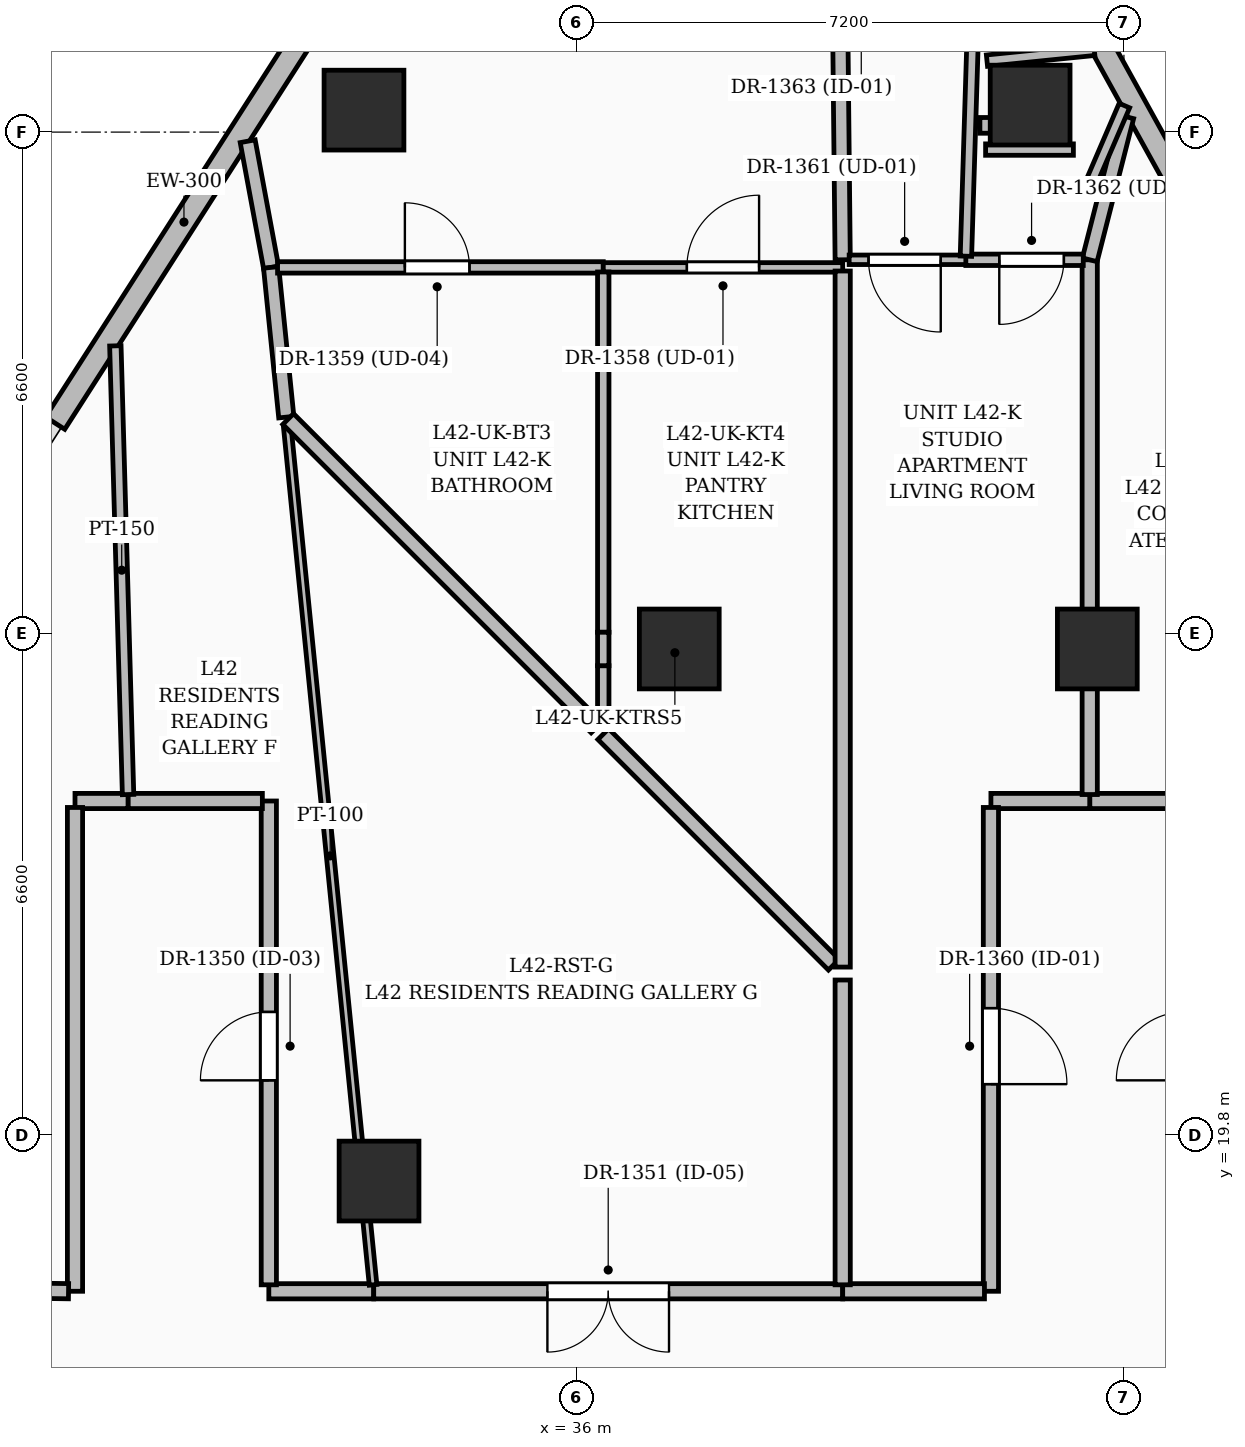
"""IFC4 building model, lengths in metres.
Left out: names, types, materials, properties, quantities, classifications, styles, units other than length and angle.
Written with IfcOpenShell. Run it as: python <this file> out.ifc"""

import sys

from ifc_helpers import new_model, si_unit, direction, frame, frame_2d, origin, origin_2d, place, context, subcontext, project, spatial, rectangle, extrude, element, fill, save


model = new_model("IFC4")
c1 = context("Model", 3, precision=1e-05, world=origin(), true_north=direction((0.0, 1.0)))
c2 = subcontext(c1, "Body", "Model", "MODEL_VIEW")
j1 = project(units=[si_unit("LENGTHUNIT", "METRE"), si_unit("PLANEANGLEUNIT", "RADIAN")], contexts=[c1])
p1 = place(None, origin())
s1 = spatial("IfcSite", under=j1, at=p1, CompositionType="ELEMENT")
p2 = place(p1, origin())
s2 = spatial("IfcBuilding", under=s1, at=p2, CompositionType="ELEMENT")
p3 = place(p2, frame((0.0, 0.0, 164.4)))
s3 = spatial("IfcBuildingStorey", under=s2, at=p3, CompositionType="ELEMENT", Elevation=164.4)
for number, where, z_axis, x_axis in (
    (1, (42.85, 26.2, 0.0), (0.0, 0.0, 1.0), (1.0, 0.0, 0.0)),
    (2, (37.35, 26.2, 0.0), (0.0, 0.0, 1.0), (1.0, 0.0, 0.0)),
    (3, (33.4, 19.2, 0.0), (0.0, 0.0, 1.0), (1.0, 0.0, 0.0)),
    (4, (41.966, 33.355, 0.0), (0.0, 0.0, 1.0), (1.0, 0.0, 0.0)),
    (5, (33.202, 33.289, 0.0), (0.0, 0.0, 1.0), (1.0, 0.0, 0.0)),
):
    element("IfcColumn", number, at=place(p3, frame(where, z_axis=z_axis, x_axis=x_axis)), inside=s3, PredefinedType="COLUMN", context=c2, shape_type="SweptSolid", body=[
        extrude(rectangle(XDim=1.05, YDim=1.05, at=origin_2d()), origin(), (0.0, 0.0, 1.0), 3.6),
    ])
p4 = place(p3, frame((29.139, 29.171, 0.0), z_axis=(0.0, 0.0, 1.0), x_axis=(0.539533329528, 0.841964242904, 0.0)))
e6 = element("IfcWall", 6, at=p4, inside=s3, PredefinedType="SOLIDWALL", context=c2, shape_type="SweptSolid", body=[
    extrude(rectangle(XDim=6.282, YDim=0.3, at=frame_2d((3.141, 0.0))), origin(), (0.0, 0.0, 1.0), 3.35),
])
p5 = place(p3, frame((42.762, 34.395, 0.0), z_axis=(0.0, 0.0, 1.0), x_axis=(0.484157246346, -0.874981005972, 0.0)))
e7 = element("IfcWall", 7, at=p5, inside=s3, PredefinedType="SOLIDWALL", context=c2, shape_type="SweptSolid", body=[
    extrude(rectangle(XDim=5.974, YDim=0.3, at=frame_2d((2.987, 0.0))), origin(), (0.0, 0.0, 1.0), 3.35),
])
p6 = place(p5, frame((2.525, 0.0, 0.6)))
e8 = element("IfcOpeningElement", 8, at=p6, cuts=e7, PredefinedType="OPENING", context=c2, shape_type="SweptSolid", body=[
    extrude(rectangle(XDim=1.5, YDim=2.1, at=frame_2d((0.75, 1.05))), frame((0.0, 0.16, 0.0), z_axis=(0.0, -1.0, 0.0), x_axis=(1.0, 0.0, 0.0)), (0.0, 0.0, 1.0), 0.32),
])
p7 = place(p3, frame((30.1, 24.2, 0.0), z_axis=(0.0, 0.0, 1.0), x_axis=(-1.0, 0.0, 0.0)))
e9 = element("IfcWall", 9, at=p7, inside=s3, PredefinedType="PARTITIONING", context=c2, shape_type="SweptSolid", body=[
    extrude(rectangle(XDim=0.7, YDim=0.2, at=frame_2d((0.35, 0.0))), origin(), (0.0, 0.0, 1.0), 2.712),
])
p8 = place(p3, frame((29.4, 24.115, 0.0), z_axis=(0.0, 0.0, 1.0), x_axis=(0.0, -1.0, 0.0)))
e10 = element("IfcWall", 10, at=p8, inside=s3, PredefinedType="PARTITIONING", context=c2, shape_type="SweptSolid", body=[
    extrude(rectangle(XDim=6.365, YDim=0.2, at=frame_2d((3.183, 0.0))), origin(), (0.0, 0.0, 1.0), 2.393),
])
p9 = place(p3, frame((29.315, 17.751, 0.0), z_axis=(0.0, 0.0, 1.0), x_axis=(-0.999898159275, 0.014271337684, 0.0)))
e11 = element("IfcWall", 11, at=p9, inside=s3, PredefinedType="PARTITIONING", context=c2, shape_type="SweptSolid", body=[
    extrude(rectangle(XDim=7.288, YDim=0.2, at=frame_2d((3.644, 0.0))), origin(), (0.0, 0.0, 1.0), 2.393),
])
p10 = place(p9, frame((2.879, 0.0, 0.0)))
e12 = element("IfcOpeningElement", 12, at=p10, cuts=e11, PredefinedType="OPENING", context=c2, shape_type="SweptSolid", body=[
    extrude(rectangle(XDim=1.6, YDim=2.3, at=frame_2d((0.8, 1.15))), frame((0.0, 0.11, 0.0), z_axis=(0.0, -1.0, 0.0), x_axis=(1.0, 0.0, 0.0)), (0.0, 0.0, 1.0), 0.22),
])
p11 = place(p3, frame((33.33, 17.75, 0.0), z_axis=(0.0, 0.0, 1.0), x_axis=(-1.0, 0.0, 0.0)))
e13 = element("IfcWall", 13, at=p11, inside=s3, PredefinedType="PARTITIONING", context=c2, shape_type="SweptSolid", body=[
    extrude(rectangle(XDim=1.38, YDim=0.2, at=frame_2d((0.69, 0.0))), origin(), (0.0, 0.0, 1.0), 3.35),
])
p12 = place(p3, frame((31.95, 17.835, 0.0), z_axis=(0.0, 0.0, 1.0), x_axis=(0.0, 1.0, 0.0)))
e14 = element("IfcWall", 14, at=p12, inside=s3, PredefinedType="PARTITIONING", context=c2, shape_type="SweptSolid", body=[
    extrude(rectangle(XDim=6.365, YDim=0.2, at=frame_2d((3.183, 0.0))), origin(), (0.0, 0.0, 1.0), 2.393),
])
p13 = place(p12, frame((2.69, 0.0, 0.0)))
e15 = element("IfcOpeningElement", 15, at=p13, cuts=e14, PredefinedType="OPENING", context=c2, shape_type="SweptSolid", body=[
    extrude(rectangle(XDim=0.9, YDim=2.1, at=frame_2d((0.45, 1.05))), frame((0.0, 0.11, 0.0), z_axis=(0.0, -1.0, 0.0), x_axis=(1.0, 0.0, 0.0)), (0.0, 0.0, 1.0), 0.22),
])
p14 = place(p3, frame((31.865, 24.2, 0.0), z_axis=(0.0, 0.0, 1.0), x_axis=(-1.0, 0.0, 0.0)))
e16 = element("IfcWall", 16, at=p14, inside=s3, PredefinedType="PARTITIONING", context=c2, shape_type="SweptSolid", body=[
    extrude(rectangle(XDim=1.765, YDim=0.2, at=frame_2d((0.882, 0.0))), origin(), (0.0, 0.0, 1.0), 2.712),
])
p15 = place(p3, frame((39.5, 17.75, 0.0), z_axis=(0.0, 0.0, 1.0), x_axis=(-1.0, 0.0, 0.0)))
e17 = element("IfcWall", 17, at=p15, inside=s3, PredefinedType="PARTITIONING", context=c2, shape_type="SweptSolid", body=[
    extrude(rectangle(XDim=6.17, YDim=0.2, at=frame_2d((3.085, 0.0))), origin(), (0.0, 0.0, 1.0), 2.436),
])
p16 = place(p15, frame((2.285, 0.0, 0.0)))
e18 = element("IfcOpeningElement", 18, at=p16, cuts=e17, PredefinedType="OPENING", context=c2, shape_type="SweptSolid", body=[
    extrude(rectangle(XDim=1.6, YDim=2.3, at=frame_2d((0.8, 1.15))), frame((0.0, 0.11, 0.0), z_axis=(0.0, -1.0, 0.0), x_axis=(1.0, 0.0, 0.0)), (0.0, 0.0, 1.0), 0.22),
])
p17 = place(p3, frame((43.915, 24.2, 0.0), z_axis=(0.0, 0.0, 1.0), x_axis=(-1.0, 0.0, 0.0)))
e19 = element("IfcWall", 19, at=p17, inside=s3, PredefinedType="PARTITIONING", context=c2, shape_type="SweptSolid", body=[
    extrude(rectangle(XDim=1.165, YDim=0.2, at=frame_2d((0.583, 0.0))), origin(), (0.0, 0.0, 1.0), 2.436),
])
p18 = place(p3, frame((42.75, 24.2, 0.0), z_axis=(0.0, 0.0, 1.0), x_axis=(-1.0, 0.0, 0.0)))
e20 = element("IfcWall", 20, at=p18, inside=s3, PredefinedType="PARTITIONING", context=c2, shape_type="SweptSolid", body=[
    extrude(rectangle(XDim=1.3, YDim=0.2, at=frame_2d((0.65, 0.0))), origin(), (0.0, 0.0, 1.0), 3.35),
])
p19 = place(p3, frame((41.45, 24.115, 0.0), z_axis=(0.0, 0.0, 1.0), x_axis=(0.0, -1.0, 0.0)))
e21 = element("IfcWall", 21, at=p19, inside=s3, PredefinedType="PARTITIONING", context=c2, shape_type="SweptSolid", body=[
    extrude(rectangle(XDim=6.365, YDim=0.2, at=frame_2d((3.183, 0.0))), origin(), (0.0, 0.0, 1.0), 3.35),
])
p20 = place(p19, frame((2.64, 0.0, 0.0)))
e22 = element("IfcOpeningElement", 22, at=p20, cuts=e21, PredefinedType="OPENING", context=c2, shape_type="SweptSolid", body=[
    extrude(rectangle(XDim=1.0, YDim=2.2, at=frame_2d((0.5, 1.1))), frame((0.0, 0.11, 0.0), z_axis=(0.0, -1.0, 0.0), x_axis=(1.0, 0.0, 0.0)), (0.0, 0.0, 1.0), 0.22),
])
p21 = place(p3, frame((41.365, 17.75, 0.0), z_axis=(0.0, 0.0, 1.0), x_axis=(-1.0, 0.0, 0.0)))
e23 = element("IfcWall", 23, at=p21, inside=s3, PredefinedType="PARTITIONING", context=c2, shape_type="SweptSolid", body=[
    extrude(rectangle(XDim=1.865, YDim=0.2, at=frame_2d((0.933, 0.0))), origin(), (0.0, 0.0, 1.0), 3.35),
])
p22 = place(p3, frame((30.098, 24.285, 0.0), z_axis=(0.0, 0.0, 1.0), x_axis=(-0.02836031544, 0.999597765358, 0.0)))
e24 = element("IfcWall", 24, at=p22, inside=s3, PredefinedType="PARTITIONING", context=c2, shape_type="SweptSolid", body=[
    extrude(rectangle(XDim=5.906, YDim=0.15, at=frame_2d((2.953, 0.0))), origin(), (0.0, 0.0, 1.0), 2.57),
])
p23 = place(p3, frame((33.322, 17.835, 0.0), z_axis=(0.0, 0.0, 1.0), x_axis=(-0.099510112586, 0.995036550833, 0.0)))
e25 = element("IfcWall", 25, at=p23, inside=s3, PredefinedType="PARTITIONING", context=c2, shape_type="SweptSolid", body=[
    extrude(rectangle(XDim=11.342, YDim=0.1, at=frame_2d((5.671, 0.0))), origin(), (0.0, 0.0, 1.0), 2.393),
])
p24 = place(p3, frame((31.98, 31.22, 0.0), z_axis=(0.0, 0.0, 1.0), x_axis=(-0.18235853501, 0.983232101138, 0.0)))
e26 = element("IfcWall", 26, at=p24, inside=s3, PredefinedType="PARTITIONING", context=c2, shape_type="SweptSolid", body=[
    extrude(rectangle(XDim=1.688, YDim=0.2, at=frame_2d((0.844, 0.0))), origin(), (0.0, 0.0, 1.0), 2.57),
])
p25 = place(p3, frame((32.18, 29.25, 0.0), z_axis=(0.0, 0.0, 1.0), x_axis=(-0.100980739114, 0.994888380839, 0.0)))
e27 = element("IfcWall", 27, at=p25, inside=s3, PredefinedType="PARTITIONING", context=c2, shape_type="SweptSolid", body=[
    extrude(rectangle(XDim=1.98, YDim=0.2, at=frame_2d((0.99, 0.0))), origin(), (0.0, 0.0, 1.0), 2.57),
])
p26 = place(p3, frame((36.262, 25.168, 0.0), z_axis=(0.0, 0.0, 1.0), x_axis=(-0.707128056834, 0.707085504899, 0.0)))
e28 = element("IfcWall", 28, at=p26, inside=s3, PredefinedType="PARTITIONING", context=c2, shape_type="SweptSolid", body=[
    extrude(rectangle(XDim=5.738, YDim=0.2, at=frame_2d((2.869, 0.0))), origin(), (0.0, 0.0, 1.0), 2.712),
])
p27 = place(p3, frame((39.383, 22.047, 0.0), z_axis=(0.0, 0.0, 1.0), x_axis=(-0.707078324468, 0.70713523676, 0.0)))
e29 = element("IfcWall", 29, at=p27, inside=s3, PredefinedType="PARTITIONING", context=c2, shape_type="SweptSolid", body=[
    extrude(rectangle(XDim=4.29, YDim=0.2, at=frame_2d((2.145, 0.0))), origin(), (0.0, 0.0, 1.0), 2.436),
])
p28 = place(p3, frame((39.5, 17.835, 0.0), z_axis=(0.0, 0.0, 1.0), x_axis=(0.0, 1.0, 0.0)))
e30 = element("IfcWall", 30, at=p28, inside=s3, PredefinedType="PARTITIONING", context=c2, shape_type="SweptSolid", body=[
    extrude(rectangle(XDim=4.01, YDim=0.2, at=frame_2d((2.005, 0.0))), origin(), (0.0, 0.0, 1.0), 3.35),
])
p29 = place(p3, frame((42.75, 31.32, 0.0), z_axis=(0.0, 0.0, 1.0), x_axis=(0.0, -1.0, 0.0)))
e31 = element("IfcWall", 31, at=p29, inside=s3, PredefinedType="PARTITIONING", context=c2, shape_type="SweptSolid", body=[
    extrude(rectangle(XDim=7.035, YDim=0.2, at=frame_2d((3.518, 0.0))), origin(), (0.0, 0.0, 1.0), 2.393),
])
p30 = place(p3, frame((43.23, 33.202, 0.0), z_axis=(0.0, 0.0, 1.0), x_axis=(-0.247413379041, -0.968910016396, 0.0)))
e32 = element("IfcWall", 32, at=p30, inside=s3, PredefinedType="PARTITIONING", context=c2, shape_type="SweptSolid", body=[
    extrude(rectangle(XDim=1.942, YDim=0.2, at=frame_2d((0.971, 0.0))), origin(), (0.0, 0.0, 1.0), 2.57),
])
p31 = place(p3, frame((32.065, 31.22, 0.0), z_axis=(0.0, 0.0, 1.0), x_axis=(1.0, 0.0, 0.0)))
e33 = element("IfcWall", 33, at=p31, inside=s3, PredefinedType="PARTITIONING", context=c2, shape_type="SweptSolid", body=[
    extrude(rectangle(XDim=4.285, YDim=0.15, at=frame_2d((2.143, 0.0))), origin(), (0.0, 0.0, 1.0), 2.393),
])
p32 = place(p31, frame((1.675, 0.0, 0.0)))
e34 = element("IfcOpeningElement", 34, at=p32, cuts=e33, PredefinedType="OPENING", context=c2, shape_type="SweptSolid", body=[
    extrude(rectangle(XDim=0.85, YDim=2.1, at=frame_2d((0.425, 1.05))), frame((0.0, 0.085, 0.0), z_axis=(0.0, -1.0, 0.0), x_axis=(1.0, 0.0, 0.0)), (0.0, 0.0, 1.0), 0.17),
])
p33 = place(p3, frame((36.35, 31.22, 0.0), z_axis=(0.0, 0.0, 1.0), x_axis=(1.0, 0.0, 0.0)))
e35 = element("IfcWall", 35, at=p33, inside=s3, PredefinedType="PARTITIONING", context=c2, shape_type="SweptSolid", body=[
    extrude(rectangle(XDim=3.15, YDim=0.125, at=frame_2d((1.575, 0.0))), origin(), (0.0, 0.0, 1.0), 2.712),
])
p34 = place(p33, frame((1.1, 0.0, 0.0)))
e36 = element("IfcOpeningElement", 36, at=p34, cuts=e35, PredefinedType="OPENING", context=c2, shape_type="SweptSolid", body=[
    extrude(rectangle(XDim=0.95, YDim=2.2, at=frame_2d((0.475, 1.1))), frame((0.0, 0.072, 0.0), z_axis=(0.0, -1.0, 0.0), x_axis=(1.0, 0.0, 0.0)), (0.0, 0.0, 1.0), 0.145),
])
p35 = place(p3, frame((39.5, 31.32, 0.0), z_axis=(0.0, 0.0, 1.0), x_axis=(-0.010545456067, 0.999944395132, 0.0)))
e37 = element("IfcWall", 37, at=p35, inside=s3, PredefinedType="PARTITIONING", context=c2, shape_type="SweptSolid", body=[
    extrude(rectangle(XDim=6.645, YDim=0.2, at=frame_2d((3.322, 0.0))), origin(), (0.0, 0.0, 1.0), 2.57),
])
p36 = place(p35, frame((2.889, 0.0, 0.0)))
e38 = element("IfcOpeningElement", 38, at=p36, cuts=e37, PredefinedType="OPENING", context=c2, shape_type="SweptSolid", body=[
    extrude(rectangle(XDim=1.0, YDim=2.2, at=frame_2d((0.5, 1.1))), frame((0.0, 0.11, 0.0), z_axis=(0.0, -1.0, 0.0), x_axis=(1.0, 0.0, 0.0)), (0.0, 0.0, 1.0), 0.22),
])
p37 = place(p3, frame((36.35, 25.165, 0.0), z_axis=(0.0, 0.0, 1.0), x_axis=(0.0, 1.0, 0.0)))
e39 = element("IfcWall", 39, at=p37, inside=s3, PredefinedType="PARTITIONING", context=c2, shape_type="SweptSolid", body=[
    extrude(rectangle(XDim=0.815, YDim=0.15, at=frame_2d((0.407, 0.0))), origin(), (0.0, 0.0, 1.0), 3.35),
])
p38 = place(p3, frame((36.35, 26.42, 0.0), z_axis=(0.0, 0.0, 1.0), x_axis=(0.0, 1.0, 0.0)))
e40 = element("IfcWall", 40, at=p38, inside=s3, PredefinedType="PARTITIONING", context=c2, shape_type="SweptSolid", body=[
    extrude(rectangle(XDim=4.74, YDim=0.15, at=frame_2d((2.37, 0.0))), origin(), (0.0, 0.0, 1.0), 2.393),
])
p39 = place(p3, frame((39.5, 22.015, 0.0), z_axis=(0.0, 0.0, 1.0), x_axis=(0.0, 1.0, 0.0)))
e41 = element("IfcWall", 41, at=p39, inside=s3, PredefinedType="PARTITIONING", context=c2, shape_type="SweptSolid", body=[
    extrude(rectangle(XDim=9.158, YDim=0.2, at=frame_2d((4.579, 0.0))), origin(), (0.0, 0.0, 1.0), 2.436),
])
p40 = place(p3, frame((41.13, 31.32, 0.0), z_axis=(0.0, 0.0, 1.0), x_axis=(-1.0, 0.0, 0.0)))
e42 = element("IfcWall", 42, at=p40, inside=s3, PredefinedType="PARTITIONING", context=c2, shape_type="SweptSolid", body=[
    extrude(rectangle(XDim=1.545, YDim=0.125, at=frame_2d((0.772, 0.0))), origin(), (0.0, 0.0, 1.0), 3.35),
])
p41 = place(p40, frame((0.34, 0.0, 0.0)))
e43 = element("IfcOpeningElement", 43, at=p41, cuts=e42, PredefinedType="OPENING", context=c2, shape_type="SweptSolid", body=[
    extrude(rectangle(XDim=0.95, YDim=2.2, at=frame_2d((0.475, 1.1))), frame((0.0, 0.072, 0.0), z_axis=(0.0, -1.0, 0.0), x_axis=(1.0, 0.0, 0.0)), (0.0, 0.0, 1.0), 0.145),
])
p42 = place(p3, frame((42.665, 31.32, 0.0), z_axis=(0.0, 0.0, 1.0), x_axis=(-1.0, 0.0, 0.0)))
e44 = element("IfcWall", 44, at=p42, inside=s3, PredefinedType="PARTITIONING", context=c2, shape_type="SweptSolid", body=[
    extrude(rectangle(XDim=1.545, YDim=0.15, at=frame_2d((0.772, 0.0))), origin(), (0.0, 0.0, 1.0), 2.393),
])
p43 = place(p42, frame((0.255, 0.0, 0.0)))
e45 = element("IfcOpeningElement", 45, at=p43, cuts=e44, PredefinedType="OPENING", context=c2, shape_type="SweptSolid", body=[
    extrude(rectangle(XDim=0.85, YDim=2.1, at=frame_2d((0.425, 1.05))), frame((0.0, 0.085, 0.0), z_axis=(0.0, -1.0, 0.0), x_axis=(1.0, 0.0, 0.0)), (0.0, 0.0, 1.0), 0.17),
])
p44 = place(p3, frame((41.121, 31.367, 0.0), z_axis=(0.0, 0.0, 1.0), x_axis=(0.03100123119, 0.999519346318, 0.0)))
e46 = element("IfcWall", 46, at=p44, inside=s3, PredefinedType="PARTITIONING", context=c2, shape_type="SweptSolid", body=[
    extrude(rectangle(XDim=5.418, YDim=0.15, at=frame_2d((2.709, 0.0))), origin(), (0.0, 0.0, 1.0), 2.57),
])
p45 = place(p3, frame((36.35, 25.98, 0.0), z_axis=(0.0, 0.0, 1.0), x_axis=(0.0, 1.0, 0.0)))
e47 = element("IfcWall", 47, at=p45, inside=s3, PredefinedType="PARTITIONING", context=c2, shape_type="SweptSolid", body=[
    extrude(rectangle(XDim=0.44, YDim=0.15, at=frame_2d((0.22, 0.0))), origin(), (0.0, 0.0, 1.0), 3.35),
])
p46 = place(p3, frame((42.75, 32.29, 0.0), z_axis=(0.0, 0.0, 1.0), x_axis=(0.3955030033, 0.918464683252, 0.0)))
e48 = element("IfcWall", 48, at=p46, inside=s3, PredefinedType="PARTITIONING", context=c2, shape_type="SweptSolid", body=[
    extrude(rectangle(XDim=1.153, YDim=0.15, at=frame_2d((0.577, 0.0))), origin(), (0.0, 0.0, 1.0), 2.57),
])
p47 = place(p3, frame((42.535, 32.77, 0.0), z_axis=(0.0, 0.0, 1.0), x_axis=(-1.0, 0.0, 0.0)))
e49 = element("IfcWall", 49, at=p47, inside=s3, PredefinedType="PARTITIONING", context=c2, shape_type="SweptSolid", body=[
    extrude(rectangle(XDim=1.155, YDim=0.15, at=frame_2d((0.578, 0.0))), origin(), (0.0, 0.0, 1.0), 2.393),
])
p48 = place(p3, frame((41.38, 32.985, 0.0), z_axis=(0.0, 0.0, 1.0), x_axis=(0.0, 1.0, 0.0)))
e50 = element("IfcWall", 50, at=p48, inside=s3, PredefinedType="PARTITIONING", context=c2, shape_type="SweptSolid", body=[
    extrude(rectangle(XDim=0.207, YDim=0.15, at=frame_2d((0.104, 0.0))), origin(), (0.0, 0.0, 1.0), 2.57),
])
p49 = place(p3, frame((41.398, 33.94, 0.0), z_axis=(0.0, 0.0, 1.0), x_axis=(0.994906914974, 0.10079796891, 0.0)))
e51 = element("IfcWall", 51, at=p49, inside=s3, PredefinedType="PARTITIONING", context=c2, shape_type="SweptSolid", body=[
    extrude(rectangle(XDim=1.419, YDim=0.15, at=frame_2d((0.71, 0.0))), origin(), (0.0, 0.0, 1.0), 3.35),
])
p50 = place(p13, origin())
e52 = element("IfcDoor", 52, at=p50, inside=s3, OperationType="SINGLE_SWING_LEFT", PredefinedType="DOOR", context=c2, shape_type="SweptSolid", body=[
    extrude(rectangle(XDim=0.9, YDim=2.1, at=frame_2d((0.45, 1.05))), frame((0.0, 0.025, 0.0), z_axis=(0.0, -1.0, 0.0), x_axis=(1.0, 0.0, 0.0)), (0.0, 0.0, 1.0), 0.05),
])
fill(e15, e52)
p51 = place(p16, origin())
e53 = element("IfcDoor", 53, at=p51, inside=s3, OperationType="DOUBLE_DOOR_SINGLE_SWING", PredefinedType="DOOR", context=c2, shape_type="SweptSolid", body=[
    extrude(rectangle(XDim=1.6, YDim=2.3, at=frame_2d((0.8, 1.15))), frame((0.0, 0.025, 0.0), z_axis=(0.0, -1.0, 0.0), x_axis=(1.0, 0.0, 0.0)), (0.0, 0.0, 1.0), 0.05),
])
fill(e18, e53)
p52 = place(p34, origin())
e54 = element("IfcDoor", 54, at=p52, inside=s3, OperationType="SINGLE_SWING_RIGHT", PredefinedType="DOOR", context=c2, shape_type="SweptSolid", body=[
    extrude(rectangle(XDim=0.95, YDim=2.2, at=frame_2d((0.475, 1.1))), frame((0.0, 0.025, 0.0), z_axis=(0.0, -1.0, 0.0), x_axis=(1.0, 0.0, 0.0)), (0.0, 0.0, 1.0), 0.05),
])
fill(e36, e54)
p53 = place(p32, origin())
e55 = element("IfcDoor", 55, at=p53, inside=s3, OperationType="SINGLE_SWING_LEFT", PredefinedType="DOOR", context=c2, shape_type="SweptSolid", body=[
    extrude(rectangle(XDim=0.85, YDim=2.1, at=frame_2d((0.425, 1.05))), frame((0.0, 0.025, 0.0), z_axis=(0.0, -1.0, 0.0), x_axis=(1.0, 0.0, 0.0)), (0.0, 0.0, 1.0), 0.05),
])
fill(e34, e55)
p54 = place(p20, origin())
e56 = element("IfcDoor", 56, at=p54, inside=s3, OperationType="SINGLE_SWING_RIGHT", PredefinedType="DOOR", context=c2, shape_type="SweptSolid", body=[
    extrude(rectangle(XDim=1.0, YDim=2.2, at=frame_2d((0.5, 1.1))), frame((0.0, 0.025, 0.0), z_axis=(0.0, -1.0, 0.0), x_axis=(1.0, 0.0, 0.0)), (0.0, 0.0, 1.0), 0.05),
])
fill(e22, e56)
p55 = place(p41, origin())
e57 = element("IfcDoor", 57, at=p55, inside=s3, OperationType="SINGLE_SWING_LEFT", PredefinedType="DOOR", context=c2, shape_type="SweptSolid", body=[
    extrude(rectangle(XDim=0.95, YDim=2.2, at=frame_2d((0.475, 1.1))), frame((0.0, 0.025, 0.0), z_axis=(0.0, -1.0, 0.0), x_axis=(1.0, 0.0, 0.0)), (0.0, 0.0, 1.0), 0.05),
])
fill(e43, e57)
p56 = place(p43, origin())
e58 = element("IfcDoor", 58, at=p56, inside=s3, OperationType="SINGLE_SWING_RIGHT", PredefinedType="DOOR", context=c2, shape_type="SweptSolid", body=[
    extrude(rectangle(XDim=0.85, YDim=2.1, at=frame_2d((0.425, 1.05))), frame((0.0, 0.025, 0.0), z_axis=(0.0, -1.0, 0.0), x_axis=(1.0, 0.0, 0.0)), (0.0, 0.0, 1.0), 0.05),
])
fill(e45, e58)
save(model, sys.argv[1])
